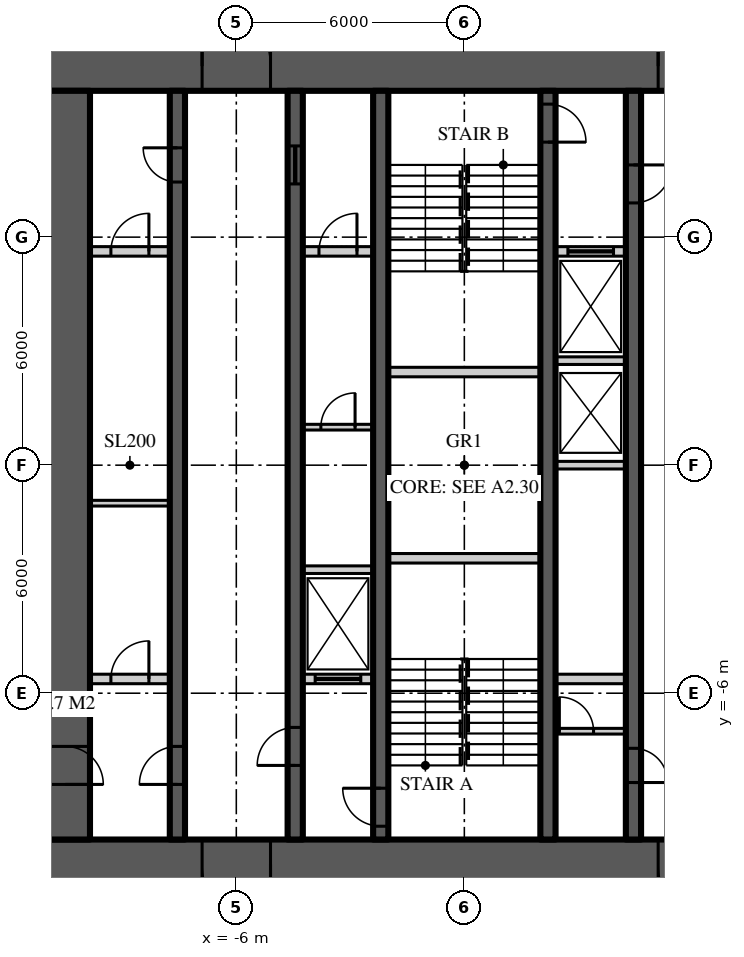
"""IFC4 building model, lengths in metres.
Left out: names, types, materials, properties, quantities, classifications, styles, units other than length and angle.
Written with IfcOpenShell. Run it as: python <this file> out.ifc"""

import sys

from ifc_helpers import new_model, si_unit, direction, frame, frame_2d, origin, place, context, subcontext, project, spatial, rectangle, extrude, element, fill, save


model = new_model("IFC4")
c1 = context("Model", 3, precision=1e-05, world=origin(), true_north=direction((0.0, 1.0)))
c2 = subcontext(c1, "Body", "Model", "MODEL_VIEW")
j1 = project(units=[si_unit("LENGTHUNIT", "METRE"), si_unit("PLANEANGLEUNIT", "RADIAN")], contexts=[c1])
p1 = place(None, origin())
s1 = spatial("IfcSite", under=j1, at=p1, CompositionType="ELEMENT")
p2 = place(p1, origin())
s2 = spatial("IfcBuilding", under=s1, at=p2, CompositionType="ELEMENT")
p3 = place(p2, frame((0.0, 0.0, 220.5)))
s3 = spatial("IfcBuildingStorey", under=s2, at=p3, CompositionType="ELEMENT", Elevation=220.5)
p4 = place(p3, frame((-11.15, 10.5, 0.0), z_axis=(0.0, 0.0, 1.0), x_axis=(1.0, 0.0, 0.0)))
e1 = element("IfcWall", 1, at=p4, inside=s3, PredefinedType="SHEAR", context=c2, shape_type="SweptSolid", body=[
    extrude(rectangle(XDim=22.3, YDim=1.3, at=frame_2d((11.15, 0.0))), origin(), (0.0, 0.0, 1.0), 3.9),
])
p5 = place(p4, frame((4.25, 0.0, 0.0)))
e2 = element("IfcOpeningElement", 2, at=p5, cuts=e1, PredefinedType="OPENING", context=c2, shape_type="SweptSolid", body=[
    extrude(rectangle(XDim=1.8, YDim=2.2, at=frame_2d((0.9, 1.1))), frame((0.0, 0.66, 0.0), z_axis=(0.0, -1.0, 0.0), x_axis=(1.0, 0.0, 0.0)), (0.0, 0.0, 1.0), 1.32),
])
p6 = place(p4, frame((16.25, 0.0, 0.0)))
e3 = element("IfcOpeningElement", 3, at=p6, cuts=e1, PredefinedType="OPENING", context=c2, shape_type="SweptSolid", body=[
    extrude(rectangle(XDim=1.8, YDim=2.2, at=frame_2d((0.9, 1.1))), frame((0.0, 0.66, 0.0), z_axis=(0.0, -1.0, 0.0), x_axis=(1.0, 0.0, 0.0)), (0.0, 0.0, 1.0), 1.32),
])
p7 = place(p3, frame((11.15, -10.5, 0.0), z_axis=(0.0, 0.0, 1.0), x_axis=(-1.0, 0.0, 0.0)))
e4 = element("IfcWall", 4, at=p7, inside=s3, PredefinedType="SHEAR", context=c2, shape_type="SweptSolid", body=[
    extrude(rectangle(XDim=22.3, YDim=1.3, at=frame_2d((11.15, 0.0))), origin(), (0.0, 0.0, 1.0), 3.9),
])
p8 = place(p7, frame((16.25, 0.0, 0.0)))
e5 = element("IfcOpeningElement", 5, at=p8, cuts=e4, PredefinedType="OPENING", context=c2, shape_type="SweptSolid", body=[
    extrude(rectangle(XDim=1.8, YDim=2.2, at=frame_2d((0.9, 1.1))), frame((0.0, 0.66, 0.0), z_axis=(0.0, -1.0, 0.0), x_axis=(1.0, 0.0, 0.0)), (0.0, 0.0, 1.0), 1.32),
])
p9 = place(p7, frame((4.25, 0.0, 0.0)))
e6 = element("IfcOpeningElement", 6, at=p9, cuts=e4, PredefinedType="OPENING", context=c2, shape_type="SweptSolid", body=[
    extrude(rectangle(XDim=1.8, YDim=2.2, at=frame_2d((0.9, 1.1))), frame((0.0, 0.66, 0.0), z_axis=(0.0, -1.0, 0.0), x_axis=(1.0, 0.0, 0.0)), (0.0, 0.0, 1.0), 1.32),
])
p10 = place(p3, frame((-10.5, 9.85, 0.0), z_axis=(0.0, 0.0, 1.0), x_axis=(0.0, -1.0, 0.0)))
e7 = element("IfcWall", 7, at=p10, inside=s3, PredefinedType="SHEAR", context=c2, shape_type="SweptSolid", body=[
    extrude(rectangle(XDim=19.7, YDim=1.3, at=frame_2d((9.85, 0.0))), origin(), (0.0, 0.0, 1.0), 3.9),
])
p11 = place(p10, frame((17.25, 0.0, 0.0)))
e8 = element("IfcOpeningElement", 8, at=p11, cuts=e7, PredefinedType="OPENING", context=c2, shape_type="SweptSolid", body=[
    extrude(rectangle(XDim=1.0, YDim=2.2, at=frame_2d((0.5, 1.1))), frame((0.0, 0.66, 0.0), z_axis=(0.0, -1.0, 0.0), x_axis=(1.0, 0.0, 0.0)), (0.0, 0.0, 1.0), 1.32),
])
p12 = place(p3, frame((-7.55, -9.85, 0.0), z_axis=(0.0, 0.0, 1.0), x_axis=(0.0, 1.0, 0.0)))
e9 = element("IfcWall", 9, at=p12, inside=s3, PredefinedType="SHEAR", context=c2, shape_type="SweptSolid", body=[
    extrude(rectangle(XDim=19.7, YDim=0.4, at=frame_2d((9.85, 0.0))), origin(), (0.0, 0.0, 1.0), 3.9),
])
p13 = place(p12, frame((1.45, 0.0, 0.0)))
e10 = element("IfcOpeningElement", 10, at=p13, cuts=e9, PredefinedType="OPENING", context=c2, shape_type="SweptSolid", body=[
    extrude(rectangle(XDim=1.0, YDim=2.2, at=frame_2d((0.5, 1.1))), frame((0.0, 0.21, 0.0), z_axis=(0.0, -1.0, 0.0), x_axis=(1.0, 0.0, 0.0)), (0.0, 0.0, 1.0), 0.42),
])
p14 = place(p12, frame((17.3, 0.0, 0.0)))
e11 = element("IfcOpeningElement", 11, at=p14, cuts=e9, PredefinedType="OPENING", context=c2, shape_type="SweptSolid", body=[
    extrude(rectangle(XDim=0.9, YDim=2.1, at=frame_2d((0.45, 1.05))), frame((0.0, 0.21, 0.0), z_axis=(0.0, -1.0, 0.0), x_axis=(1.0, 0.0, 0.0)), (0.0, 0.0, 1.0), 0.42),
])
p15 = place(p3, frame((-4.45, -9.85, 0.0), z_axis=(0.0, 0.0, 1.0), x_axis=(0.0, 1.0, 0.0)))
e12 = element("IfcWall", 12, at=p15, inside=s3, PredefinedType="SHEAR", context=c2, shape_type="SweptSolid", body=[
    extrude(rectangle(XDim=19.7, YDim=0.4, at=frame_2d((9.85, 0.0))), origin(), (0.0, 0.0, 1.0), 3.9),
])
p16 = place(p15, frame((1.95, 0.0, 0.0)))
e13 = element("IfcOpeningElement", 13, at=p16, cuts=e12, PredefinedType="OPENING", context=c2, shape_type="SweptSolid", body=[
    extrude(rectangle(XDim=1.0, YDim=2.2, at=frame_2d((0.5, 1.1))), frame((0.0, 0.21, 0.0), z_axis=(0.0, -1.0, 0.0), x_axis=(1.0, 0.0, 0.0)), (0.0, 0.0, 1.0), 0.42),
])
p17 = place(p15, frame((17.25, 0.0, 0.0)))
e14 = element("IfcOpeningElement", 14, at=p17, cuts=e12, PredefinedType="OPENING", context=c2, shape_type="SweptSolid", body=[
    extrude(rectangle(XDim=1.0, YDim=2.1, at=frame_2d((0.5, 1.05))), frame((0.0, 0.21, 0.0), z_axis=(0.0, -1.0, 0.0), x_axis=(1.0, 0.0, 0.0)), (0.0, 0.0, 1.0), 0.42),
])
p18 = place(p3, frame((4.45, 9.85, 0.0), z_axis=(0.0, 0.0, 1.0), x_axis=(0.0, -1.0, 0.0)))
e15 = element("IfcWall", 15, at=p18, inside=s3, PredefinedType="SHEAR", context=c2, shape_type="SweptSolid", body=[
    extrude(rectangle(XDim=19.7, YDim=0.4, at=frame_2d((9.85, 0.0))), origin(), (0.0, 0.0, 1.0), 3.9),
])
p19 = place(p18, frame((1.95, 0.0, 0.0)))
e16 = element("IfcOpeningElement", 16, at=p19, cuts=e15, PredefinedType="OPENING", context=c2, shape_type="SweptSolid", body=[
    extrude(rectangle(XDim=1.0, YDim=2.2, at=frame_2d((0.5, 1.1))), frame((0.0, 0.21, 0.0), z_axis=(0.0, -1.0, 0.0), x_axis=(1.0, 0.0, 0.0)), (0.0, 0.0, 1.0), 0.42),
])
p20 = place(p18, frame((17.3, 0.0, 0.0)))
e17 = element("IfcOpeningElement", 17, at=p20, cuts=e15, PredefinedType="OPENING", context=c2, shape_type="SweptSolid", body=[
    extrude(rectangle(XDim=0.9, YDim=2.1, at=frame_2d((0.45, 1.05))), frame((0.0, 0.21, 0.0), z_axis=(0.0, -1.0, 0.0), x_axis=(1.0, 0.0, 0.0)), (0.0, 0.0, 1.0), 0.42),
])
p21 = place(p3, frame((-2.2, -9.85, 0.0), z_axis=(0.0, 0.0, 1.0), x_axis=(0.0, 1.0, 0.0)))
e18 = element("IfcWall", 18, at=p21, inside=s3, PredefinedType="SHEAR", context=c2, shape_type="SweptSolid", body=[
    extrude(rectangle(XDim=19.7, YDim=0.4, at=frame_2d((9.85, 0.0))), origin(), (0.0, 0.0, 1.0), 3.9),
])
p22 = place(p21, frame((0.35, 0.0, 0.0)))
e19 = element("IfcOpeningElement", 19, at=p22, cuts=e18, PredefinedType="OPENING", context=c2, shape_type="SweptSolid", body=[
    extrude(rectangle(XDim=1.0, YDim=2.2, at=frame_2d((0.5, 1.1))), frame((0.0, 0.21, 0.0), z_axis=(0.0, -1.0, 0.0), x_axis=(1.0, 0.0, 0.0)), (0.0, 0.0, 1.0), 0.42),
])
p23 = place(p3, frame((2.2, 9.85, 0.0), z_axis=(0.0, 0.0, 1.0), x_axis=(0.0, -1.0, 0.0)))
e20 = element("IfcWall", 20, at=p23, inside=s3, PredefinedType="SHEAR", context=c2, shape_type="SweptSolid", body=[
    extrude(rectangle(XDim=19.7, YDim=0.4, at=frame_2d((9.85, 0.0))), origin(), (0.0, 0.0, 1.0), 3.9),
])
p24 = place(p23, frame((0.35, 0.0, 0.0)))
e21 = element("IfcOpeningElement", 21, at=p24, cuts=e20, PredefinedType="OPENING", context=c2, shape_type="SweptSolid", body=[
    extrude(rectangle(XDim=1.0, YDim=2.2, at=frame_2d((0.5, 1.1))), frame((0.0, 0.21, 0.0), z_axis=(0.0, -1.0, 0.0), x_axis=(1.0, 0.0, 0.0)), (0.0, 0.0, 1.0), 0.42),
])
p25 = place(p3, frame((-9.85, 5.625, 0.0), z_axis=(0.0, 0.0, 1.0), x_axis=(1.0, 0.0, 0.0)))
e22 = element("IfcWall", 22, at=p25, inside=s3, PredefinedType="SOLIDWALL", context=c2, shape_type="SweptSolid", body=[
    extrude(rectangle(XDim=2.1, YDim=0.25, at=frame_2d((1.05, 0.0))), origin(), (0.0, 0.0, 1.0), 3.7),
])
p26 = place(p25, frame((0.55, 0.0, 0.0)))
e23 = element("IfcOpeningElement", 23, at=p26, cuts=e22, PredefinedType="OPENING", context=c2, shape_type="SweptSolid", body=[
    extrude(rectangle(XDim=1.0, YDim=2.2, at=frame_2d((0.5, 1.1))), frame((0.0, 0.135, 0.0), z_axis=(0.0, -1.0, 0.0), x_axis=(1.0, 0.0, 0.0)), (0.0, 0.0, 1.0), 0.27),
])
p27 = place(p3, frame((-4.25, 5.625, 0.0), z_axis=(0.0, 0.0, 1.0), x_axis=(1.0, 0.0, 0.0)))
e24 = element("IfcWall", 24, at=p27, inside=s3, PredefinedType="SOLIDWALL", context=c2, shape_type="SweptSolid", body=[
    extrude(rectangle(XDim=1.85, YDim=0.25, at=frame_2d((0.925, 0.0))), origin(), (0.0, 0.0, 1.0), 3.7),
])
p28 = place(p27, frame((0.425, 0.0, 0.0)))
e25 = element("IfcOpeningElement", 25, at=p28, cuts=e24, PredefinedType="OPENING", context=c2, shape_type="SweptSolid", body=[
    extrude(rectangle(XDim=1.0, YDim=2.2, at=frame_2d((0.5, 1.1))), frame((0.0, 0.135, 0.0), z_axis=(0.0, -1.0, 0.0), x_axis=(1.0, 0.0, 0.0)), (0.0, 0.0, 1.0), 0.27),
])
p29 = place(p3, frame((2.4, 5.625, 0.0), z_axis=(0.0, 0.0, 1.0), x_axis=(1.0, 0.0, 0.0)))
e26 = element("IfcWall", 26, at=p29, inside=s3, PredefinedType="SOLIDWALL", context=c2, shape_type="SweptSolid", body=[
    extrude(rectangle(XDim=1.85, YDim=0.25, at=frame_2d((0.925, 0.0))), origin(), (0.0, 0.0, 1.0), 3.7),
])
p30 = place(p29, frame((0.325, 0.0, 0.0)))
e27 = element("IfcOpeningElement", 27, at=p30, cuts=e26, PredefinedType="OPENING", context=c2, shape_type="SweptSolid", body=[
    extrude(rectangle(XDim=1.2, YDim=2.2, at=frame_2d((0.6, 1.1))), frame((0.0, 0.135, 0.0), z_axis=(0.0, -1.0, 0.0), x_axis=(1.0, 0.0, 0.0)), (0.0, 0.0, 1.0), 0.27),
])
p31 = place(p3, frame((-9.85, -5.625, 0.0), z_axis=(0.0, 0.0, 1.0), x_axis=(1.0, 0.0, 0.0)))
e28 = element("IfcWall", 28, at=p31, inside=s3, PredefinedType="SOLIDWALL", context=c2, shape_type="SweptSolid", body=[
    extrude(rectangle(XDim=2.1, YDim=0.25, at=frame_2d((1.05, 0.0))), origin(), (0.0, 0.0, 1.0), 3.7),
])
p32 = place(p31, frame((0.55, 0.0, 0.0)))
e29 = element("IfcOpeningElement", 29, at=p32, cuts=e28, PredefinedType="OPENING", context=c2, shape_type="SweptSolid", body=[
    extrude(rectangle(XDim=1.0, YDim=2.2, at=frame_2d((0.5, 1.1))), frame((0.0, 0.135, 0.0), z_axis=(0.0, -1.0, 0.0), x_axis=(1.0, 0.0, 0.0)), (0.0, 0.0, 1.0), 0.27),
])
p33 = place(p3, frame((-4.25, -5.625, 0.0), z_axis=(0.0, 0.0, 1.0), x_axis=(1.0, 0.0, 0.0)))
e30 = element("IfcWall", 30, at=p33, inside=s3, PredefinedType="SOLIDWALL", context=c2, shape_type="SweptSolid", body=[
    extrude(rectangle(XDim=1.85, YDim=0.25, at=frame_2d((0.925, 0.0))), origin(), (0.0, 0.0, 1.0), 3.7),
])
p34 = place(p33, frame((0.325, 0.0, 0.0)))
e31 = element("IfcOpeningElement", 31, at=p34, cuts=e30, PredefinedType="OPENING", context=c2, shape_type="SweptSolid", body=[
    extrude(rectangle(XDim=1.2, YDim=2.2, at=frame_2d((0.6, 1.1))), frame((0.0, 0.135, 0.0), z_axis=(0.0, -1.0, 0.0), x_axis=(1.0, 0.0, 0.0)), (0.0, 0.0, 1.0), 0.27),
])
p35 = place(p3, frame((2.4, -5.625, 0.0), z_axis=(0.0, 0.0, 1.0), x_axis=(1.0, 0.0, 0.0)))
e32 = element("IfcWall", 32, at=p35, inside=s3, PredefinedType="SOLIDWALL", context=c2, shape_type="SweptSolid", body=[
    extrude(rectangle(XDim=1.85, YDim=0.25, at=frame_2d((0.925, 0.0))), origin(), (0.0, 0.0, 1.0), 3.7),
])
for number, where, z_axis, x_axis in (
    (33, (-2.0, -2.45, 0.0), (0.0, 0.0, 1.0), (1.0, 0.0, 0.0)),
    (34, (-2.0, 2.45, 0.0), (0.0, 0.0, 1.0), (1.0, 0.0, 0.0)),
):
    element("IfcWall", number, at=place(p3, frame(where, z_axis=z_axis, x_axis=x_axis)), inside=s3, PredefinedType="SOLIDWALL", context=c2, shape_type="SweptSolid", body=[
        extrude(rectangle(XDim=4.0, YDim=0.25, at=frame_2d((2.0, 0.0))), origin(), (0.0, 0.0, 1.0), 3.7),
    ])
for number, where, z_axis, x_axis in (
    (35, (-4.25, -2.75, 0.0), (0.0, 0.0, 1.0), (1.0, 0.0, 0.0)),
    (36, (2.4, 0.0, 0.0), (0.0, 0.0, 1.0), (1.0, 0.0, 0.0)),
    (37, (2.4, 2.75, 0.0), (0.0, 0.0, 1.0), (1.0, 0.0, 0.0)),
):
    element("IfcWall", number, at=place(p3, frame(where, z_axis=z_axis, x_axis=x_axis)), inside=s3, PredefinedType="SOLIDWALL", context=c2, shape_type="SweptSolid", body=[
        extrude(rectangle(XDim=1.85, YDim=0.2, at=frame_2d((0.925, 0.0))), origin(), (0.0, 0.0, 1.0), 3.7),
    ])
p36 = place(p3, frame((-9.85, -1.0, 0.0), z_axis=(0.0, 0.0, 1.0), x_axis=(1.0, 0.0, 0.0)))
e38 = element("IfcWall", 38, at=p36, inside=s3, PredefinedType="SOLIDWALL", context=c2, shape_type="SweptSolid", body=[
    extrude(rectangle(XDim=2.1, YDim=0.15, at=frame_2d((1.05, 0.0))), origin(), (0.0, 0.0, 1.0), 3.77),
])
p37 = place(p3, frame((-4.25, 1.0, 0.0), z_axis=(0.0, 0.0, 1.0), x_axis=(1.0, 0.0, 0.0)))
e39 = element("IfcWall", 39, at=p37, inside=s3, PredefinedType="SOLIDWALL", context=c2, shape_type="SweptSolid", body=[
    extrude(rectangle(XDim=1.85, YDim=0.15, at=frame_2d((0.925, 0.0))), origin(), (0.0, 0.0, 1.0), 3.77),
])
p38 = place(p37, frame((0.475, 0.0, 0.0)))
e40 = element("IfcOpeningElement", 40, at=p38, cuts=e39, PredefinedType="OPENING", context=c2, shape_type="SweptSolid", body=[
    extrude(rectangle(XDim=0.9, YDim=2.1, at=frame_2d((0.45, 1.05))), frame((0.0, 0.085, 0.0), z_axis=(0.0, -1.0, 0.0), x_axis=(1.0, 0.0, 0.0)), (0.0, 0.0, 1.0), 0.17),
])
p39 = place(p3, frame((2.4, -7.0, 0.0), z_axis=(0.0, 0.0, 1.0), x_axis=(1.0, 0.0, 0.0)))
e41 = element("IfcWall", 41, at=p39, inside=s3, PredefinedType="SOLIDWALL", context=c2, shape_type="SweptSolid", body=[
    extrude(rectangle(XDim=1.85, YDim=0.15, at=frame_2d((0.925, 0.0))), origin(), (0.0, 0.0, 1.0), 3.77),
])
p40 = place(p39, frame((0.1, 0.0, 0.0)))
e42 = element("IfcOpeningElement", 42, at=p40, cuts=e41, PredefinedType="OPENING", context=c2, shape_type="SweptSolid", body=[
    extrude(rectangle(XDim=0.9, YDim=2.1, at=frame_2d((0.45, 1.05))), frame((0.0, 0.085, 0.0), z_axis=(0.0, -1.0, 0.0), x_axis=(1.0, 0.0, 0.0)), (0.0, 0.0, 1.0), 0.17),
])
p41 = place(p5, origin())
e43 = element("IfcDoor", 43, at=p41, inside=s3, OperationType="DOUBLE_DOOR_DOUBLE_SWING", PredefinedType="DOOR", context=c2, shape_type="SweptSolid", body=[
    extrude(rectangle(XDim=1.8, YDim=2.2, at=frame_2d((0.9, 1.1))), frame((0.0, 0.025, 0.0), z_axis=(0.0, -1.0, 0.0), x_axis=(1.0, 0.0, 0.0)), (0.0, 0.0, 1.0), 0.05),
])
fill(e2, e43)
p42 = place(p8, origin())
e44 = element("IfcDoor", 44, at=p42, inside=s3, OperationType="DOUBLE_DOOR_DOUBLE_SWING", PredefinedType="DOOR", context=c2, shape_type="SweptSolid", body=[
    extrude(rectangle(XDim=1.8, YDim=2.2, at=frame_2d((0.9, 1.1))), frame((0.0, 0.025, 0.0), z_axis=(0.0, -1.0, 0.0), x_axis=(1.0, 0.0, 0.0)), (0.0, 0.0, 1.0), 0.05),
])
fill(e5, e44)
p43 = place(p6, origin())
e45 = element("IfcDoor", 45, at=p43, inside=s3, OperationType="DOUBLE_DOOR_DOUBLE_SWING", PredefinedType="DOOR", context=c2, shape_type="SweptSolid", body=[
    extrude(rectangle(XDim=1.8, YDim=2.2, at=frame_2d((0.9, 1.1))), frame((0.0, 0.025, 0.0), z_axis=(0.0, -1.0, 0.0), x_axis=(1.0, 0.0, 0.0)), (0.0, 0.0, 1.0), 0.05),
])
fill(e3, e45)
p44 = place(p9, origin())
e46 = element("IfcDoor", 46, at=p44, inside=s3, OperationType="DOUBLE_DOOR_DOUBLE_SWING", PredefinedType="DOOR", context=c2, shape_type="SweptSolid", body=[
    extrude(rectangle(XDim=1.8, YDim=2.2, at=frame_2d((0.9, 1.1))), frame((0.0, 0.025, 0.0), z_axis=(0.0, -1.0, 0.0), x_axis=(1.0, 0.0, 0.0)), (0.0, 0.0, 1.0), 0.05),
])
fill(e6, e46)
p45 = place(p13, origin())
e47 = element("IfcDoor", 47, at=p45, inside=s3, OperationType="SINGLE_SWING_LEFT", PredefinedType="DOOR", context=c2, shape_type="SweptSolid", body=[
    extrude(rectangle(XDim=1.0, YDim=2.2, at=frame_2d((0.5, 1.1))), frame((0.0, 0.025, 0.0), z_axis=(0.0, -1.0, 0.0), x_axis=(1.0, 0.0, 0.0)), (0.0, 0.0, 1.0), 0.05),
])
fill(e10, e47)
p46 = place(p11, origin())
e48 = element("IfcDoor", 48, at=p46, inside=s3, OperationType="SINGLE_SWING_RIGHT", PredefinedType="DOOR", context=c2, shape_type="SweptSolid", body=[
    extrude(rectangle(XDim=1.0, YDim=2.2, at=frame_2d((0.5, 1.1))), frame((0.0, 0.025, 0.0), z_axis=(0.0, -1.0, 0.0), x_axis=(1.0, 0.0, 0.0)), (0.0, 0.0, 1.0), 0.05),
])
fill(e8, e48)
p47 = place(p16, origin())
e49 = element("IfcDoor", 49, at=p47, inside=s3, OperationType="SINGLE_SWING_LEFT", PredefinedType="DOOR", context=c2, shape_type="SweptSolid", body=[
    extrude(rectangle(XDim=1.0, YDim=2.2, at=frame_2d((0.5, 1.1))), frame((0.0, 0.025, 0.0), z_axis=(0.0, -1.0, 0.0), x_axis=(1.0, 0.0, 0.0)), (0.0, 0.0, 1.0), 0.05),
])
fill(e13, e49)
p48 = place(p22, origin())
e50 = element("IfcDoor", 50, at=p48, inside=s3, OperationType="SINGLE_SWING_RIGHT", PredefinedType="DOOR", context=c2, shape_type="SweptSolid", body=[
    extrude(rectangle(XDim=1.0, YDim=2.2, at=frame_2d((0.5, 1.1))), frame((0.0, 0.025, 0.0), z_axis=(0.0, -1.0, 0.0), x_axis=(1.0, 0.0, 0.0)), (0.0, 0.0, 1.0), 0.05),
])
fill(e19, e50)
p49 = place(p19, origin())
e51 = element("IfcDoor", 51, at=p49, inside=s3, OperationType="SINGLE_SWING_LEFT", PredefinedType="DOOR", context=c2, shape_type="SweptSolid", body=[
    extrude(rectangle(XDim=1.0, YDim=2.2, at=frame_2d((0.5, 1.1))), frame((0.0, 0.025, 0.0), z_axis=(0.0, -1.0, 0.0), x_axis=(1.0, 0.0, 0.0)), (0.0, 0.0, 1.0), 0.05),
])
fill(e16, e51)
p50 = place(p24, origin())
e52 = element("IfcDoor", 52, at=p50, inside=s3, OperationType="SINGLE_SWING_RIGHT", PredefinedType="DOOR", context=c2, shape_type="SweptSolid", body=[
    extrude(rectangle(XDim=1.0, YDim=2.2, at=frame_2d((0.5, 1.1))), frame((0.0, 0.025, 0.0), z_axis=(0.0, -1.0, 0.0), x_axis=(1.0, 0.0, 0.0)), (0.0, 0.0, 1.0), 0.05),
])
fill(e21, e52)
p51 = place(p14, origin())
e53 = element("IfcDoor", 53, at=p51, inside=s3, OperationType="SINGLE_SWING_RIGHT", PredefinedType="DOOR", context=c2, shape_type="SweptSolid", body=[
    extrude(rectangle(XDim=0.9, YDim=2.1, at=frame_2d((0.45, 1.05))), frame((0.0, 0.025, 0.0), z_axis=(0.0, -1.0, 0.0), x_axis=(1.0, 0.0, 0.0)), (0.0, 0.0, 1.0), 0.05),
])
fill(e11, e53)
p52 = place(p17, origin())
e54 = element("IfcDoor", 54, at=p52, inside=s3, OperationType="SLIDING_TO_LEFT", PredefinedType="DOOR", context=c2, shape_type="SweptSolid", body=[
    extrude(rectangle(XDim=1.0, YDim=2.1, at=frame_2d((0.5, 1.05))), frame((0.0, 0.025, 0.0), z_axis=(0.0, -1.0, 0.0), x_axis=(1.0, 0.0, 0.0)), (0.0, 0.0, 1.0), 0.05),
])
fill(e14, e54)
p53 = place(p20, origin())
e55 = element("IfcDoor", 55, at=p53, inside=s3, OperationType="SINGLE_SWING_RIGHT", PredefinedType="DOOR", context=c2, shape_type="SweptSolid", body=[
    extrude(rectangle(XDim=0.9, YDim=2.1, at=frame_2d((0.45, 1.05))), frame((0.0, 0.025, 0.0), z_axis=(0.0, -1.0, 0.0), x_axis=(1.0, 0.0, 0.0)), (0.0, 0.0, 1.0), 0.05),
])
fill(e17, e55)
p54 = place(p34, origin())
e56 = element("IfcDoor", 56, at=p54, inside=s3, OperationType="SLIDING_TO_LEFT", PredefinedType="DOOR", context=c2, shape_type="SweptSolid", body=[
    extrude(rectangle(XDim=1.2, YDim=2.2, at=frame_2d((0.6, 1.1))), frame((0.0, 0.025, 0.0), z_axis=(0.0, -1.0, 0.0), x_axis=(1.0, 0.0, 0.0)), (0.0, 0.0, 1.0), 0.05),
])
fill(e31, e56)
p55 = place(p30, origin())
e57 = element("IfcDoor", 57, at=p55, inside=s3, OperationType="SLIDING_TO_LEFT", PredefinedType="DOOR", context=c2, shape_type="SweptSolid", body=[
    extrude(rectangle(XDim=1.2, YDim=2.2, at=frame_2d((0.6, 1.1))), frame((0.0, 0.025, 0.0), z_axis=(0.0, -1.0, 0.0), x_axis=(1.0, 0.0, 0.0)), (0.0, 0.0, 1.0), 0.05),
])
fill(e27, e57)
p56 = place(p26, origin())
e58 = element("IfcDoor", 58, at=p56, inside=s3, OperationType="SINGLE_SWING_RIGHT", PredefinedType="DOOR", context=c2, shape_type="SweptSolid", body=[
    extrude(rectangle(XDim=1.0, YDim=2.2, at=frame_2d((0.5, 1.1))), frame((0.0, 0.025, 0.0), z_axis=(0.0, -1.0, 0.0), x_axis=(1.0, 0.0, 0.0)), (0.0, 0.0, 1.0), 0.05),
])
fill(e23, e58)
p57 = place(p32, origin())
e59 = element("IfcDoor", 59, at=p57, inside=s3, OperationType="SINGLE_SWING_RIGHT", PredefinedType="DOOR", context=c2, shape_type="SweptSolid", body=[
    extrude(rectangle(XDim=1.0, YDim=2.2, at=frame_2d((0.5, 1.1))), frame((0.0, 0.025, 0.0), z_axis=(0.0, -1.0, 0.0), x_axis=(1.0, 0.0, 0.0)), (0.0, 0.0, 1.0), 0.05),
])
fill(e29, e59)
p58 = place(p38, origin())
e60 = element("IfcDoor", 60, at=p58, inside=s3, OperationType="SINGLE_SWING_RIGHT", PredefinedType="DOOR", context=c2, shape_type="SweptSolid", body=[
    extrude(rectangle(XDim=0.9, YDim=2.1, at=frame_2d((0.45, 1.05))), frame((0.0, 0.025, 0.0), z_axis=(0.0, -1.0, 0.0), x_axis=(1.0, 0.0, 0.0)), (0.0, 0.0, 1.0), 0.05),
])
fill(e40, e60)
p59 = place(p28, origin())
e61 = element("IfcDoor", 61, at=p59, inside=s3, OperationType="SINGLE_SWING_RIGHT", PredefinedType="DOOR", context=c2, shape_type="SweptSolid", body=[
    extrude(rectangle(XDim=1.0, YDim=2.2, at=frame_2d((0.5, 1.1))), frame((0.0, 0.025, 0.0), z_axis=(0.0, -1.0, 0.0), x_axis=(1.0, 0.0, 0.0)), (0.0, 0.0, 1.0), 0.05),
])
fill(e25, e61)
p60 = place(p40, origin())
e62 = element("IfcDoor", 62, at=p60, inside=s3, OperationType="SINGLE_SWING_LEFT", PredefinedType="DOOR", context=c2, shape_type="SweptSolid", body=[
    extrude(rectangle(XDim=0.9, YDim=2.1, at=frame_2d((0.45, 1.05))), frame((0.0, 0.025, 0.0), z_axis=(0.0, -1.0, 0.0), x_axis=(1.0, 0.0, 0.0)), (0.0, 0.0, 1.0), 0.05),
])
fill(e42, e62)
save(model, sys.argv[1])
